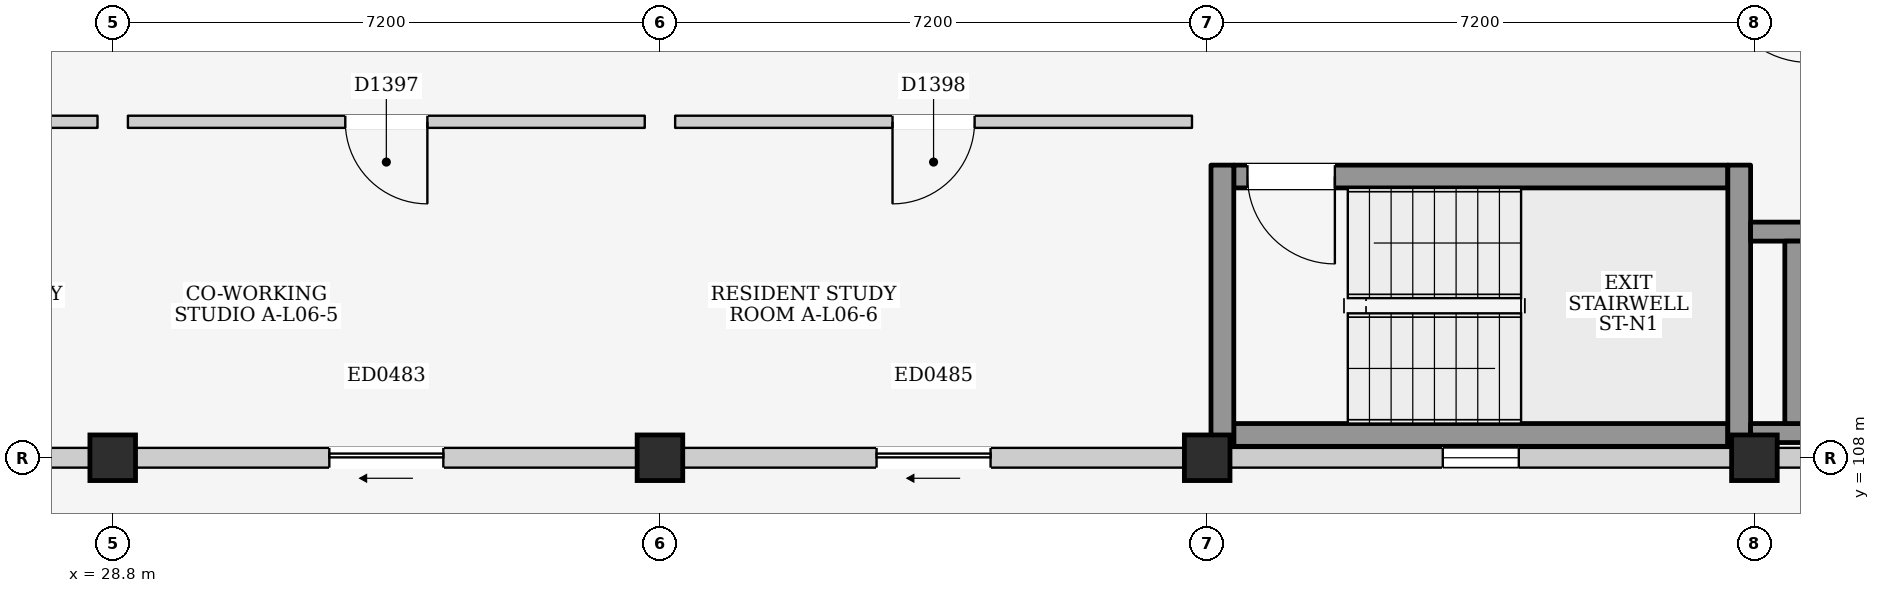
"""IFC4 building model, lengths in metres.
Left out: names, types, materials, properties, quantities, classifications, styles, units other than length and angle.
Written with IfcOpenShell. Run it as: python <this file> out.ifc"""

import sys

from ifc_helpers import new_model, si_unit, direction, frame, frame_2d, origin, origin_2d, place, context, subcontext, project, spatial, rectangle, extrude, element, fill, save


model = new_model("IFC4")
c1 = context("Model", 3, precision=1e-05, world=origin(), true_north=direction((0.0, 1.0)))
c2 = subcontext(c1, "Body", "Model", "MODEL_VIEW")
j1 = project(units=[si_unit("LENGTHUNIT", "METRE"), si_unit("PLANEANGLEUNIT", "RADIAN")], contexts=[c1])
p1 = place(None, origin())
s1 = spatial("IfcSite", under=j1, at=p1, CompositionType="ELEMENT")
p2 = place(p1, origin())
s2 = spatial("IfcBuilding", under=s1, at=p2, CompositionType="ELEMENT")
p3 = place(p2, frame((0.0, 0.0, 21.9)))
s3 = spatial("IfcBuildingStorey", under=s2, at=p3, CompositionType="ELEMENT", Elevation=21.9)
for number, where, z_axis, x_axis in (
    (1, (28.8, 108.0, 0.0), (0.0, 0.0, 1.0), (1.0, 0.0, 0.0)),
    (2, (36.0, 108.0, 0.0), (0.0, 0.0, 1.0), (1.0, 0.0, 0.0)),
    (3, (43.2, 108.0, 0.0), (0.0, 0.0, 1.0), (1.0, 0.0, 0.0)),
    (4, (50.4, 108.0, 0.0), (0.0, 0.0, 1.0), (1.0, 0.0, 0.0)),
):
    element("IfcColumn", number, at=place(p3, frame(where, z_axis=z_axis, x_axis=x_axis)), inside=s3, PredefinedType="COLUMN", context=c2, shape_type="SweptSolid", body=[
        extrude(rectangle(XDim=0.6, YDim=0.6, at=origin_2d()), origin(), (0.0, 0.0, 1.0), 3.2),
    ])
p4 = place(p3, frame((21.9, 108.0, 0.0), z_axis=(0.0, 0.0, 1.0), x_axis=(1.0, 0.0, 0.0)))
e5 = element("IfcWall", 5, at=p4, inside=s3, PredefinedType="ELEMENTEDWALL", context=c2, shape_type="SweptSolid", body=[
    extrude(rectangle(XDim=6.6, YDim=0.26, at=frame_2d((3.3, 0.0))), origin(), (0.0, 0.0, 1.0), 2.315),
])
p5 = place(p4, frame((2.55, 0.0, 0.0)))
e6 = element("IfcOpeningElement", 6, at=p5, cuts=e5, PredefinedType="OPENING", context=c2, shape_type="SweptSolid", body=[
    extrude(rectangle(XDim=1.5, YDim=2.12, at=frame_2d((0.75, 1.06))), frame((0.0, 0.145, 0.0), z_axis=(0.0, -1.0, 0.0), x_axis=(1.0, 0.0, 0.0)), (0.0, 0.0, 1.0), 0.29),
])
p6 = place(p3, frame((29.1, 108.0, 0.0), z_axis=(0.0, 0.0, 1.0), x_axis=(1.0, 0.0, 0.0)))
e7 = element("IfcWall", 7, at=p6, inside=s3, PredefinedType="ELEMENTEDWALL", context=c2, shape_type="SweptSolid", body=[
    extrude(rectangle(XDim=6.6, YDim=0.26, at=frame_2d((3.3, 0.0))), origin(), (0.0, 0.0, 1.0), 2.315),
])
p7 = place(p6, frame((2.55, 0.0, 0.0)))
e8 = element("IfcOpeningElement", 8, at=p7, cuts=e7, PredefinedType="OPENING", context=c2, shape_type="SweptSolid", body=[
    extrude(rectangle(XDim=1.5, YDim=2.12, at=frame_2d((0.75, 1.06))), frame((0.0, 0.145, 0.0), z_axis=(0.0, -1.0, 0.0), x_axis=(1.0, 0.0, 0.0)), (0.0, 0.0, 1.0), 0.29),
])
p8 = place(p3, frame((36.3, 108.0, 0.0), z_axis=(0.0, 0.0, 1.0), x_axis=(1.0, 0.0, 0.0)))
e9 = element("IfcWall", 9, at=p8, inside=s3, PredefinedType="ELEMENTEDWALL", context=c2, shape_type="SweptSolid", body=[
    extrude(rectangle(XDim=6.6, YDim=0.26, at=frame_2d((3.3, 0.0))), origin(), (0.0, 0.0, 1.0), 2.315),
])
p9 = place(p8, frame((2.55, 0.0, 0.0)))
e10 = element("IfcOpeningElement", 10, at=p9, cuts=e9, PredefinedType="OPENING", context=c2, shape_type="SweptSolid", body=[
    extrude(rectangle(XDim=1.5, YDim=2.12, at=frame_2d((0.75, 1.06))), frame((0.0, 0.145, 0.0), z_axis=(0.0, -1.0, 0.0), x_axis=(1.0, 0.0, 0.0)), (0.0, 0.0, 1.0), 0.29),
])
p10 = place(p3, frame((43.5, 108.0, 0.0), z_axis=(0.0, 0.0, 1.0), x_axis=(1.0, 0.0, 0.0)))
e11 = element("IfcWall", 11, at=p10, inside=s3, PredefinedType="ELEMENTEDWALL", context=c2, shape_type="SweptSolid", body=[
    extrude(rectangle(XDim=6.6, YDim=0.26, at=frame_2d((3.3, 0.0))), origin(), (0.0, 0.0, 1.0), 2.315),
])
p11 = place(p10, frame((2.8, 0.0, 1.2)))
e12 = element("IfcOpeningElement", 12, at=p11, cuts=e11, PredefinedType="OPENING", context=c2, shape_type="SweptSolid", body=[
    extrude(rectangle(XDim=1.0, YDim=0.9, at=frame_2d((0.5, 0.45))), frame((0.0, 0.145, 0.0), z_axis=(0.0, -1.0, 0.0), x_axis=(1.0, 0.0, 0.0)), (0.0, 0.0, 1.0), 0.29),
])
p12 = place(p3, frame((50.7, 108.0, 0.0), z_axis=(0.0, 0.0, 1.0), x_axis=(1.0, 0.0, 0.0)))
e13 = element("IfcWall", 13, at=p12, inside=s3, PredefinedType="ELEMENTEDWALL", context=c2, shape_type="SweptSolid", body=[
    extrude(rectangle(XDim=6.6, YDim=0.26, at=frame_2d((3.3, 0.0))), origin(), (0.0, 0.0, 1.0), 2.315),
])
p13 = place(p12, frame((2.8, 0.0, 1.2)))
e14 = element("IfcOpeningElement", 14, at=p13, cuts=e13, PredefinedType="OPENING", context=c2, shape_type="SweptSolid", body=[
    extrude(rectangle(XDim=1.0, YDim=0.9, at=frame_2d((0.5, 0.45))), frame((0.0, 0.145, 0.0), z_axis=(0.0, -1.0, 0.0), x_axis=(1.0, 0.0, 0.0)), (0.0, 0.0, 1.0), 0.29),
])
p14 = place(p3, frame((43.55, 108.3, 0.0), z_axis=(0.0, 0.0, 1.0), x_axis=(1.0, 0.0, 0.0)))
e15 = element("IfcWall", 15, at=p14, inside=s3, PredefinedType="SHEAR", context=c2, shape_type="SweptSolid", body=[
    extrude(rectangle(XDim=6.5, YDim=0.3, at=frame_2d((3.25, 0.0))), origin(), (0.0, 0.0, 1.0), 2.98),
])
p15 = place(p3, frame((43.55, 111.7, 0.0), z_axis=(0.0, 0.0, 1.0), x_axis=(1.0, 0.0, 0.0)))
e16 = element("IfcWall", 16, at=p15, inside=s3, PredefinedType="SHEAR", context=c2, shape_type="SweptSolid", body=[
    extrude(rectangle(XDim=6.5, YDim=0.3, at=frame_2d((3.25, 0.0))), origin(), (0.0, 0.0, 1.0), 2.98),
])
p16 = place(p15, frame((0.18, 0.0, 0.0)))
e17 = element("IfcOpeningElement", 17, at=p16, cuts=e16, PredefinedType="OPENING", context=c2, shape_type="SweptSolid", body=[
    extrude(rectangle(XDim=1.15, YDim=2.2, at=frame_2d((0.575, 1.1))), frame((0.0, 0.165, 0.0), z_axis=(0.0, -1.0, 0.0), x_axis=(1.0, 0.0, 0.0)), (0.0, 0.0, 1.0), 0.33),
])
for number, where, z_axis, x_axis in (
    (18, (43.4, 108.15, 0.0), (0.0, 0.0, 1.0), (0.0, 1.0, 0.0)),
    (19, (50.2, 108.15, 0.0), (0.0, 0.0, 1.0), (0.0, 1.0, 0.0)),
):
    element("IfcWall", number, at=place(p3, frame(where, z_axis=z_axis, x_axis=x_axis)), inside=s3, PredefinedType="SHEAR", context=c2, shape_type="SweptSolid", body=[
        extrude(rectangle(XDim=3.7, YDim=0.3, at=frame_2d((1.85, 0.0))), origin(), (0.0, 0.0, 1.0), 2.98),
    ])
p17 = place(p3, frame((50.35, 108.325, 0.0), z_axis=(0.0, 0.0, 1.0), x_axis=(1.0, 0.0, 0.0)))
e20 = element("IfcWall", 20, at=p17, inside=s3, PredefinedType="SHEAR", context=c2, shape_type="SweptSolid", body=[
    extrude(rectangle(XDim=2.675, YDim=0.25, at=frame_2d((1.337, 0.0))), origin(), (0.0, 0.0, 1.0), 2.98),
])
p18 = place(p3, frame((50.35, 110.975, 0.0), z_axis=(0.0, 0.0, 1.0), x_axis=(1.0, 0.0, 0.0)))
e21 = element("IfcWall", 21, at=p18, inside=s3, PredefinedType="SHEAR", context=c2, shape_type="SweptSolid", body=[
    extrude(rectangle(XDim=2.675, YDim=0.25, at=frame_2d((1.337, 0.0))), origin(), (0.0, 0.0, 1.0), 2.98),
])
p19 = place(p18, frame((1.0, 0.0, 0.0)))
e22 = element("IfcOpeningElement", 22, at=p19, cuts=e21, PredefinedType="OPENING", context=c2, shape_type="SweptSolid", body=[
    extrude(rectangle(XDim=1.2, YDim=2.25, at=frame_2d((0.6, 1.125))), frame((0.0, 0.14, 0.0), z_axis=(0.0, -1.0, 0.0), x_axis=(1.0, 0.0, 0.0)), (0.0, 0.0, 1.0), 0.28),
])
p20 = place(p3, frame((50.925, 108.45, 0.0), z_axis=(0.0, 0.0, 1.0), x_axis=(0.0, 1.0, 0.0)))
e23 = element("IfcWall", 23, at=p20, inside=s3, PredefinedType="SHEAR", context=c2, shape_type="SweptSolid", body=[
    extrude(rectangle(XDim=2.4, YDim=0.25, at=frame_2d((1.2, 0.0))), origin(), (0.0, 0.0, 1.0), 2.98),
])
p21 = place(p3, frame((21.8, 112.42, 0.0), z_axis=(0.0, 0.0, 1.0), x_axis=(1.0, 0.0, 0.0)))
e24 = element("IfcWall", 24, at=p21, inside=s3, PredefinedType="PARTITIONING", context=c2, shape_type="SweptSolid", body=[
    extrude(rectangle(XDim=6.8, YDim=0.16, at=frame_2d((3.4, 0.0))), origin(), (0.0, 0.0, 1.0), 2.98),
])
p22 = place(p21, frame((2.86, 0.0, 0.0)))
e25 = element("IfcOpeningElement", 25, at=p22, cuts=e24, PredefinedType="OPENING", context=c2, shape_type="SweptSolid", body=[
    extrude(rectangle(XDim=1.08, YDim=2.22, at=frame_2d((0.54, 1.11))), frame((0.0, 0.095, 0.0), z_axis=(0.0, -1.0, 0.0), x_axis=(1.0, 0.0, 0.0)), (0.0, 0.0, 1.0), 0.19),
])
p23 = place(p3, frame((29.0, 112.42, 0.0), z_axis=(0.0, 0.0, 1.0), x_axis=(1.0, 0.0, 0.0)))
e26 = element("IfcWall", 26, at=p23, inside=s3, PredefinedType="PARTITIONING", context=c2, shape_type="SweptSolid", body=[
    extrude(rectangle(XDim=6.8, YDim=0.16, at=frame_2d((3.4, 0.0))), origin(), (0.0, 0.0, 1.0), 2.98),
])
p24 = place(p23, frame((2.86, 0.0, 0.0)))
e27 = element("IfcOpeningElement", 27, at=p24, cuts=e26, PredefinedType="OPENING", context=c2, shape_type="SweptSolid", body=[
    extrude(rectangle(XDim=1.08, YDim=2.22, at=frame_2d((0.54, 1.11))), frame((0.0, 0.095, 0.0), z_axis=(0.0, -1.0, 0.0), x_axis=(1.0, 0.0, 0.0)), (0.0, 0.0, 1.0), 0.19),
])
p25 = place(p3, frame((36.2, 112.42, 0.0), z_axis=(0.0, 0.0, 1.0), x_axis=(1.0, 0.0, 0.0)))
e28 = element("IfcWall", 28, at=p25, inside=s3, PredefinedType="PARTITIONING", context=c2, shape_type="SweptSolid", body=[
    extrude(rectangle(XDim=6.8, YDim=0.16, at=frame_2d((3.4, 0.0))), origin(), (0.0, 0.0, 1.0), 2.98),
])
p26 = place(p25, frame((2.86, 0.0, 0.0)))
e29 = element("IfcOpeningElement", 29, at=p26, cuts=e28, PredefinedType="OPENING", context=c2, shape_type="SweptSolid", body=[
    extrude(rectangle(XDim=1.08, YDim=2.22, at=frame_2d((0.54, 1.11))), frame((0.0, 0.095, 0.0), z_axis=(0.0, -1.0, 0.0), x_axis=(1.0, 0.0, 0.0)), (0.0, 0.0, 1.0), 0.19),
])
p27 = place(p7, frame((1.5, 0.0, 0.0), z_axis=(0.0, 0.0, 1.0), x_axis=(-1.0, 0.0, 0.0)))
e30 = element("IfcDoor", 30, at=p27, inside=s3, OperationType="SLIDING_TO_LEFT", PredefinedType="DOOR", context=c2, shape_type="SweptSolid", body=[
    extrude(rectangle(XDim=1.5, YDim=2.12, at=frame_2d((0.75, 1.06))), frame((0.0, 0.025, 0.0), z_axis=(0.0, -1.0, 0.0), x_axis=(1.0, 0.0, 0.0)), (0.0, 0.0, 1.0), 0.05),
])
fill(e8, e30)
p28 = place(p9, frame((1.5, 0.0, 0.0), z_axis=(0.0, 0.0, 1.0), x_axis=(-1.0, 0.0, 0.0)))
e31 = element("IfcDoor", 31, at=p28, inside=s3, OperationType="SLIDING_TO_LEFT", PredefinedType="DOOR", context=c2, shape_type="SweptSolid", body=[
    extrude(rectangle(XDim=1.5, YDim=2.12, at=frame_2d((0.75, 1.06))), frame((0.0, 0.025, 0.0), z_axis=(0.0, -1.0, 0.0), x_axis=(1.0, 0.0, 0.0)), (0.0, 0.0, 1.0), 0.05),
])
fill(e10, e31)
p29 = place(p11, origin())
e32 = element("IfcWindow", 32, at=p29, inside=s3, PartitioningType="SINGLE_PANEL", PredefinedType="WINDOW", context=c2, shape_type="SweptSolid", body=[
    extrude(rectangle(XDim=1.0, YDim=0.9, at=frame_2d((0.5, 0.45))), frame((0.0, 0.03, 0.0), z_axis=(0.0, -1.0, 0.0), x_axis=(1.0, 0.0, 0.0)), (0.0, 0.0, 1.0), 0.06),
])
fill(e12, e32)
p30 = place(p16, frame((1.15, 0.0, 0.0), z_axis=(0.0, 0.0, 1.0), x_axis=(-1.0, 0.0, 0.0)))
e33 = element("IfcDoor", 33, at=p30, inside=s3, OperationType="SINGLE_SWING_LEFT", PredefinedType="DOOR", context=c2, shape_type="SweptSolid", body=[
    extrude(rectangle(XDim=1.15, YDim=2.2, at=frame_2d((0.575, 1.1))), frame((0.0, 0.025, 0.0), z_axis=(0.0, -1.0, 0.0), x_axis=(1.0, 0.0, 0.0)), (0.0, 0.0, 1.0), 0.05),
])
fill(e17, e33)
p31 = place(p24, frame((1.08, 0.0, 0.0), z_axis=(0.0, 0.0, 1.0), x_axis=(-1.0, 0.0, 0.0)))
e34 = element("IfcDoor", 34, at=p31, inside=s3, OperationType="SINGLE_SWING_LEFT", PredefinedType="DOOR", context=c2, shape_type="SweptSolid", body=[
    extrude(rectangle(XDim=1.08, YDim=2.22, at=frame_2d((0.54, 1.11))), frame((0.0, 0.025, 0.0), z_axis=(0.0, -1.0, 0.0), x_axis=(1.0, 0.0, 0.0)), (0.0, 0.0, 1.0), 0.05),
])
fill(e27, e34)
p32 = place(p26, frame((1.08, 0.0, 0.0), z_axis=(0.0, 0.0, 1.0), x_axis=(-1.0, 0.0, 0.0)))
e35 = element("IfcDoor", 35, at=p32, inside=s3, OperationType="SINGLE_SWING_RIGHT", PredefinedType="DOOR", context=c2, shape_type="SweptSolid", body=[
    extrude(rectangle(XDim=1.08, YDim=2.22, at=frame_2d((0.54, 1.11))), frame((0.0, 0.025, 0.0), z_axis=(0.0, -1.0, 0.0), x_axis=(1.0, 0.0, 0.0)), (0.0, 0.0, 1.0), 0.05),
])
fill(e29, e35)
save(model, sys.argv[1])
